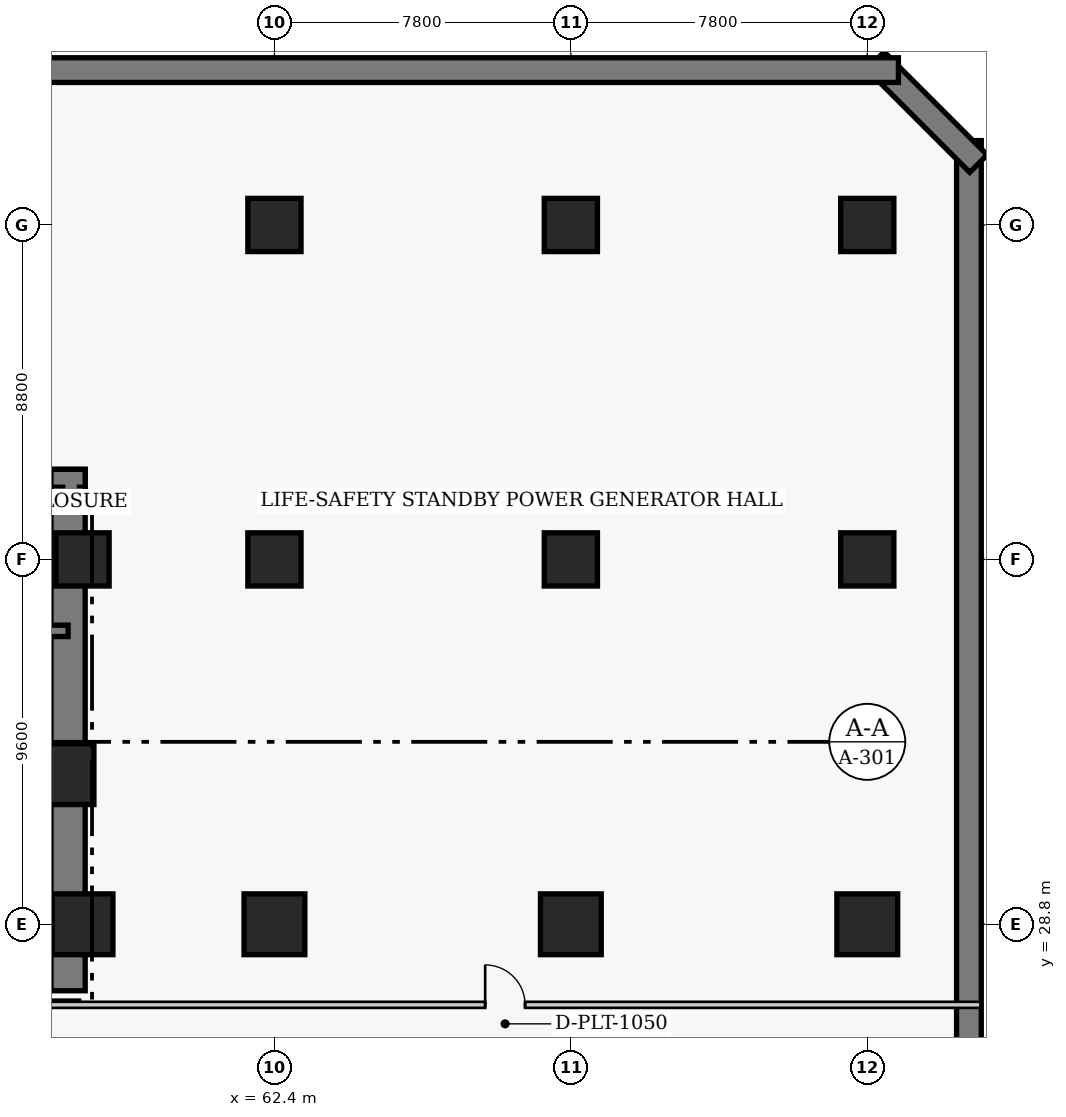
"""IFC4 building model, lengths in metres.
Left out: names, types, materials, properties, quantities, classifications, styles, units other than length and angle.
Written with IfcOpenShell. Run it as: python <this file> out.ifc"""

import sys

from ifc_helpers import new_model, si_unit, direction, frame, frame_2d, origin, origin_2d, place, context, subcontext, project, spatial, rectangle, extrude, element, fill, save


model = new_model("IFC4")
c1 = context("Model", 3, precision=1e-05, world=origin(), true_north=direction((0.0, 1.0)))
c2 = subcontext(c1, "Body", "Model", "MODEL_VIEW")
j1 = project(units=[si_unit("LENGTHUNIT", "METRE"), si_unit("PLANEANGLEUNIT", "RADIAN")], contexts=[c1])
p1 = place(None, origin())
s1 = spatial("IfcSite", under=j1, at=p1, CompositionType="ELEMENT")
p2 = place(p1, origin())
s2 = spatial("IfcBuilding", under=s1, at=p2, CompositionType="ELEMENT")
p3 = place(p2, frame((0.0, 0.0, -9.0)))
s3 = spatial("IfcBuildingStorey", under=s2, at=p3, CompositionType="ELEMENT", Elevation=-9.0)
p4 = place(p3, frame((80.675, 2.58, 0.0), z_axis=(0.0, 0.0, 1.0), x_axis=(0.0, 1.0, 0.0)))
e1 = element("IfcWall", 1, at=p4, inside=s3, PredefinedType="USERDEFINED", context=c2, shape_type="SweptSolid", body=[
    extrude(rectangle(XDim=46.84, YDim=0.65, at=frame_2d((23.42, 0.0))), origin(), (0.0, 0.0, 1.0), 4.18),
])
p5 = place(p3, frame((80.926, 48.815, 0.0), z_axis=(0.0, 0.0, 1.0), x_axis=(-0.707106781187, 0.707106781187, 0.0)))
e2 = element("IfcWall", 2, at=p5, inside=s3, PredefinedType="USERDEFINED", context=c2, shape_type="SweptSolid", body=[
    extrude(rectangle(XDim=3.834, YDim=0.65, at=frame_2d((1.917, 0.0))), origin(), (0.0, 0.0, 1.0), 4.18),
])
p6 = place(p3, frame((78.82, 51.275, 0.0), z_axis=(0.0, 0.0, 1.0), x_axis=(-1.0, 0.0, 0.0)))
e3 = element("IfcWall", 3, at=p6, inside=s3, PredefinedType="USERDEFINED", context=c2, shape_type="SweptSolid", body=[
    extrude(rectangle(XDim=79.64, YDim=0.65, at=frame_2d((39.82, 0.0))), origin(), (0.0, 0.0, 1.0), 4.18),
])
p7 = place(p3, frame((48.45, 40.32, 0.0), z_axis=(0.0, 0.0, 1.0), x_axis=(1.0, 0.0, 0.0)))
e4 = element("IfcWall", 4, at=p7, inside=s3, PredefinedType="SHEAR", context=c2, shape_type="SweptSolid", body=[
    extrude(rectangle(XDim=8.97, YDim=0.9, at=frame_2d((4.485, 0.0))), origin(), (0.0, 0.0, 1.0), 4.5),
])
p8 = place(p3, frame((56.97, 27.05, 0.0), z_axis=(0.0, 0.0, 1.0), x_axis=(0.0, 1.0, 0.0)))
e5 = element("IfcWall", 5, at=p8, inside=s3, PredefinedType="SHEAR", context=c2, shape_type="SweptSolid", body=[
    extrude(rectangle(XDim=13.72, YDim=0.9, at=frame_2d((6.86, 0.0))), origin(), (0.0, 0.0, 1.0), 4.5),
])
p9 = place(p3, frame((48.45, 36.52, 0.0), z_axis=(0.0, 0.0, 1.0), x_axis=(1.0, 0.0, 0.0)))
e6 = element("IfcWall", 6, at=p9, inside=s3, PredefinedType="SHEAR", context=c2, shape_type="SweptSolid", body=[
    extrude(rectangle(XDim=8.52, YDim=0.3, at=frame_2d((4.26, 0.0))), origin(), (0.0, 0.0, 1.0), 4.5),
])
p10 = place(p3, frame((62.4, 28.8, 0.0), z_axis=(0.0, 0.0, 1.0), x_axis=(1.0, 0.0, 0.0)))
e7 = element("IfcColumn", 7, at=p10, inside=s3, PredefinedType="COLUMN", context=c2, shape_type="SweptSolid", body=[
    extrude(rectangle(XDim=1.6, YDim=1.6, at=origin_2d()), origin(), (0.0, 0.0, 1.0), 4.5),
])
for number, where, z_axis, x_axis in (
    (8, (62.4, 38.4, 0.0), (0.0, 0.0, 1.0), (1.0, 0.0, 0.0)),
    (9, (62.4, 47.2, 0.0), (0.0, 0.0, 1.0), (1.0, 0.0, 0.0)),
):
    element("IfcColumn", number, at=place(p3, frame(where, z_axis=z_axis, x_axis=x_axis)), inside=s3, PredefinedType="COLUMN", context=c2, shape_type="SweptSolid", body=[
        extrude(rectangle(XDim=1.4, YDim=1.4, at=origin_2d()), origin(), (0.0, 0.0, 1.0), 4.5),
    ])
p11 = place(p3, frame((70.2, 28.8, 0.0), z_axis=(0.0, 0.0, 1.0), x_axis=(1.0, 0.0, 0.0)))
e10 = element("IfcColumn", 10, at=p11, inside=s3, PredefinedType="COLUMN", context=c2, shape_type="SweptSolid", body=[
    extrude(rectangle(XDim=1.6, YDim=1.6, at=origin_2d()), origin(), (0.0, 0.0, 1.0), 4.5),
])
for number, where, z_axis, x_axis in (
    (11, (70.2, 38.4, 0.0), (0.0, 0.0, 1.0), (1.0, 0.0, 0.0)),
    (12, (70.2, 47.2, 0.0), (0.0, 0.0, 1.0), (1.0, 0.0, 0.0)),
):
    element("IfcColumn", number, at=place(p3, frame(where, z_axis=z_axis, x_axis=x_axis)), inside=s3, PredefinedType="COLUMN", context=c2, shape_type="SweptSolid", body=[
        extrude(rectangle(XDim=1.4, YDim=1.4, at=origin_2d()), origin(), (0.0, 0.0, 1.0), 4.5),
    ])
p12 = place(p3, frame((78.0, 28.8, 0.0), z_axis=(0.0, 0.0, 1.0), x_axis=(1.0, 0.0, 0.0)))
e13 = element("IfcColumn", 13, at=p12, inside=s3, PredefinedType="COLUMN", context=c2, shape_type="SweptSolid", body=[
    extrude(rectangle(XDim=1.6, YDim=1.6, at=origin_2d()), origin(), (0.0, 0.0, 1.0), 4.5),
])
for number, where, z_axis, x_axis in (
    (14, (78.0, 38.4, 0.0), (0.0, 0.0, 1.0), (1.0, 0.0, 0.0)),
    (15, (78.0, 47.2, 0.0), (0.0, 0.0, 1.0), (1.0, 0.0, 0.0)),
):
    element("IfcColumn", number, at=place(p3, frame(where, z_axis=z_axis, x_axis=x_axis)), inside=s3, PredefinedType="COLUMN", context=c2, shape_type="SweptSolid", body=[
        extrude(rectangle(XDim=1.4, YDim=1.4, at=origin_2d()), origin(), (0.0, 0.0, 1.0), 4.5),
    ])
p13 = place(p3, frame((57.35, 28.8, 0.0), z_axis=(0.0, 0.0, 1.0), x_axis=(1.0, 0.0, 0.0)))
e16 = element("IfcColumn", 16, at=p13, inside=s3, PredefinedType="COLUMN", context=c2, shape_type="SweptSolid", body=[
    extrude(rectangle(XDim=1.6, YDim=1.6, at=origin_2d()), origin(), (0.0, 0.0, 1.0), 4.5),
])
p14 = place(p3, frame((57.35, 38.4, 0.0), z_axis=(0.0, 0.0, 1.0), x_axis=(1.0, 0.0, 0.0)))
e17 = element("IfcColumn", 17, at=p14, inside=s3, PredefinedType="COLUMN", context=c2, shape_type="SweptSolid", body=[
    extrude(rectangle(XDim=1.4, YDim=1.4, at=origin_2d()), origin(), (0.0, 0.0, 1.0), 4.5),
])
p15 = place(p3, frame((56.85, 32.75, 0.0), z_axis=(0.0, 0.0, 1.0), x_axis=(1.0, 0.0, 0.0)))
e18 = element("IfcColumn", 18, at=p15, inside=s3, PredefinedType="COLUMN", context=c2, shape_type="SweptSolid", body=[
    extrude(rectangle(XDim=1.6, YDim=1.6, at=origin_2d()), origin(), (0.0, 0.0, 1.0), 4.5),
])
p16 = place(p3, frame((51.12, 29.5, 0.0), z_axis=(0.0, 0.0, 1.0), x_axis=(1.0, 0.0, 0.0)))
e19 = element("IfcWall", 19, at=p16, inside=s3, PredefinedType="PARTITIONING", context=c2, shape_type="SweptSolid", body=[
    extrude(rectangle(XDim=5.63, YDim=0.16, at=frame_2d((2.815, 0.0))), origin(), (0.0, 0.0, 1.0), 4.18),
])
p17 = place(p3, frame((-2.98, 26.68, 0.0), z_axis=(0.0, 0.0, 1.0), x_axis=(1.0, 0.0, 0.0)))
e20 = element("IfcWall", 20, at=p17, inside=s3, PredefinedType="PARTITIONING", context=c2, shape_type="SweptSolid", body=[
    extrude(rectangle(XDim=83.96, YDim=0.16, at=frame_2d((41.98, 0.0))), origin(), (0.0, 0.0, 1.0), 4.18),
])
p18 = place(p17, frame((37.016, 0.0, 0.0)))
e21 = element("IfcOpeningElement", 21, at=p18, cuts=e20, PredefinedType="OPENING", context=c2, shape_type="SweptSolid", body=[
    extrude(rectangle(XDim=1.8, YDim=2.2, at=frame_2d((0.9, 1.1))), frame((0.0, 0.09, 0.0), z_axis=(0.0, -1.0, 0.0), x_axis=(1.0, 0.0, 0.0)), (0.0, 0.0, 1.0), 0.18),
])
p19 = place(p17, frame((11.775, 0.0, 0.0)))
e22 = element("IfcOpeningElement", 22, at=p19, cuts=e20, PredefinedType="OPENING", context=c2, shape_type="SweptSolid", body=[
    extrude(rectangle(XDim=1.05, YDim=2.15, at=frame_2d((0.525, 1.075))), frame((0.0, 0.09, 0.0), z_axis=(0.0, -1.0, 0.0), x_axis=(1.0, 0.0, 0.0)), (0.0, 0.0, 1.0), 0.18),
])
p20 = place(p17, frame((70.925, 0.0, 0.0)))
e23 = element("IfcOpeningElement", 23, at=p20, cuts=e20, PredefinedType="OPENING", context=c2, shape_type="SweptSolid", body=[
    extrude(rectangle(XDim=1.05, YDim=2.15, at=frame_2d((0.525, 1.075))), frame((0.0, 0.09, 0.0), z_axis=(0.0, -1.0, 0.0), x_axis=(1.0, 0.0, 0.0)), (0.0, 0.0, 1.0), 0.18),
])
p21 = place(p20, origin())
e24 = element("IfcDoor", 24, at=p21, inside=s3, OperationType="SINGLE_SWING_LEFT", PredefinedType="DOOR", context=c2, shape_type="SweptSolid", body=[
    extrude(rectangle(XDim=1.05, YDim=2.15, at=frame_2d((0.525, 1.075))), frame((0.0, 0.025, 0.0), z_axis=(0.0, -1.0, 0.0), x_axis=(1.0, 0.0, 0.0)), (0.0, 0.0, 1.0), 0.05),
])
fill(e23, e24)
save(model, sys.argv[1])
